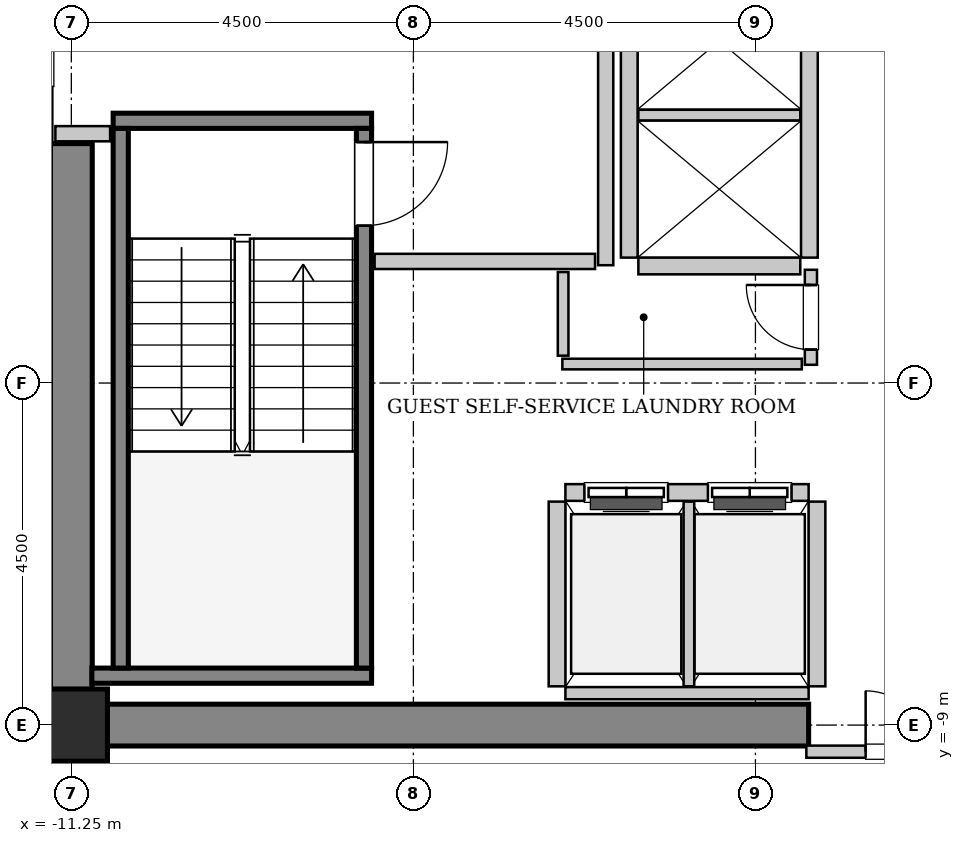
"""IFC4 building model, lengths in metres.
Left out: names, types, materials, properties, quantities, classifications, styles, units other than length and angle.
Written with IfcOpenShell. Run it as: python <this file> out.ifc"""

import sys

from ifc_helpers import new_model, si_unit, direction, frame, frame_2d, origin, origin_2d, place, context, subcontext, project, spatial, rectangle, hollow_rectangle, extrude, source, transform, mapped, element, fill, save


model = new_model("IFC4")
c1 = context("Model", 3, precision=1e-05, world=origin(), true_north=direction((0.0, 1.0)))
c2 = subcontext(c1, "Body", "Model", "MODEL_VIEW")
j1 = project(units=[si_unit("LENGTHUNIT", "METRE"), si_unit("PLANEANGLEUNIT", "RADIAN")], contexts=[c1])
p1 = place(None, origin())
s1 = spatial("IfcSite", under=j1, at=p1, CompositionType="ELEMENT")
p2 = place(p1, origin())
s2 = spatial("IfcBuilding", under=s1, at=p2, CompositionType="ELEMENT")
p3 = place(p2, frame((0.0, 0.0, 152.6)))
s3 = spatial("IfcBuildingStorey", under=s2, at=p3, CompositionType="ELEMENT", Elevation=152.6)
m1 = source(origin(), c2, "Body", "SweptSolid", [
    extrude(rectangle(XDim=9.975, YDim=0.55, at=frame_2d((4.987, 0.0))), origin(), (0.0, 0.0, 1.0), 3.8),
])
p4 = place(p3, frame((-11.525, -9.0, 0.0), z_axis=(0.0, 0.0, 1.0), x_axis=(1.0, 0.0, 0.0)))
e1 = element("IfcWall", 1, at=p4, inside=s3, PredefinedType="SHEAR", context=c2, shape_type="MappedRepresentation", body=[
    mapped(m1, transform((0.0, 0.0, 0.0), x_axis=(1.0, 0.0, 0.0), y_axis=(0.0, 1.0, 0.0), z_axis=(0.0, 0.0, 1.0), scale=1.0)),
])
m2 = source(origin(), c2, "Body", "SweptSolid", [
    extrude(rectangle(XDim=7.375, YDim=0.55, at=frame_2d((3.688, 0.0))), origin(), (0.0, 0.0, 1.0), 3.8),
])
p5 = place(p3, frame((-11.25, -8.725, 0.0), z_axis=(0.0, 0.0, 1.0), x_axis=(0.0, 1.0, 0.0)))
e2 = element("IfcWall", 2, at=p5, inside=s3, PredefinedType="SHEAR", context=c2, shape_type="MappedRepresentation", body=[
    mapped(m2, transform((0.0, 0.0, 0.0), x_axis=(1.0, 0.0, 0.0), y_axis=(0.0, 1.0, 0.0), z_axis=(0.0, 0.0, 1.0), scale=1.0)),
])
m3 = source(origin(), c2, "Body", "SweptSolid", [
    extrude(hollow_rectangle(XDim=0.95, YDim=0.95, WallThickness=0.045, InnerFilletRadius=0.045, OuterFilletRadius=0.09, at=origin_2d()), origin(), (0.0, 0.0, 1.0), 3.8),
])
p6 = place(p3, frame((-11.25, -9.0, 0.0), z_axis=(0.0, 0.0, 1.0), x_axis=(1.0, 0.0, 0.0)))
e3 = element("IfcColumn", 3, at=p6, inside=s3, PredefinedType="COLUMN", context=c2, shape_type="MappedRepresentation", body=[
    mapped(m3, transform((0.0, 0.0, 0.0), x_axis=(1.0, 0.0, 0.0), y_axis=(0.0, 1.0, 0.0), z_axis=(0.0, 0.0, 1.0), scale=1.0)),
])
m4 = source(origin(), c2, "Body", "SweptSolid", [
    extrude(rectangle(XDim=3.4, YDim=0.2, at=frame_2d((1.7, 0.0))), origin(), (0.0, 0.0, 1.0), 3.8),
])
p7 = place(p3, frame((-10.7, -1.05, 0.0), z_axis=(0.0, 0.0, 1.0), x_axis=(1.0, 0.0, 0.0)))
e4 = element("IfcWall", 4, at=p7, inside=s3, PredefinedType="SOLIDWALL", context=c2, shape_type="MappedRepresentation", body=[
    mapped(m4, transform((0.0, 0.0, 0.0), x_axis=(1.0, 0.0, 0.0), y_axis=(0.0, 1.0, 0.0), z_axis=(0.0, 0.0, 1.0), scale=1.0)),
])
m5 = source(origin(), c2, "Body", "SweptSolid", [
    extrude(rectangle(XDim=3.68, YDim=0.2, at=frame_2d((1.84, 0.0))), origin(), (0.0, 0.0, 1.0), 3.8),
])
p8 = place(p3, frame((-10.98, -8.35, 0.0), z_axis=(0.0, 0.0, 1.0), x_axis=(1.0, 0.0, 0.0)))
e5 = element("IfcWall", 5, at=p8, inside=s3, PredefinedType="SOLIDWALL", context=c2, shape_type="MappedRepresentation", body=[
    mapped(m5, transform((0.0, 0.0, 0.0), x_axis=(1.0, 0.0, 0.0), y_axis=(0.0, 1.0, 0.0), z_axis=(0.0, 0.0, 1.0), scale=1.0)),
])
m6 = source(origin(), c2, "Body", "SweptSolid", [
    extrude(rectangle(XDim=7.1, YDim=0.2, at=frame_2d((3.55, 0.0))), origin(), (0.0, 0.0, 1.0), 3.8),
])
p9 = place(p3, frame((-10.6, -1.15, 0.0), z_axis=(0.0, 0.0, 1.0), x_axis=(0.0, -1.0, 0.0)))
e6 = element("IfcWall", 6, at=p9, inside=s3, PredefinedType="SOLIDWALL", context=c2, shape_type="MappedRepresentation", body=[
    mapped(m6, transform((0.0, 0.0, 0.0), x_axis=(1.0, 0.0, 0.0), y_axis=(0.0, 1.0, 0.0), z_axis=(0.0, 0.0, 1.0), scale=1.0)),
])
p10 = place(p3, frame((-7.4, -1.15, 0.0), z_axis=(0.0, 0.0, 1.0), x_axis=(0.0, -1.0, 0.0)))
e7 = element("IfcWall", 7, at=p10, inside=s3, PredefinedType="SOLIDWALL", context=c2, shape_type="MappedRepresentation", body=[
    mapped(m6, transform((0.0, 0.0, 0.0), x_axis=(1.0, 0.0, 0.0), y_axis=(0.0, 1.0, 0.0), z_axis=(0.0, 0.0, 1.0), scale=1.0)),
])
p11 = place(p10, frame((0.18, 0.0, 0.0)))
e8 = element("IfcOpeningElement", 8, at=p11, cuts=e7, PredefinedType="OPENING", context=c2, shape_type="SweptSolid", body=[
    extrude(rectangle(XDim=1.1, YDim=2.15, at=frame_2d((0.55, 1.075))), frame((0.0, 0.11, 0.0), z_axis=(0.0, -1.0, 0.0), x_axis=(1.0, 0.0, 0.0)), (0.0, 0.0, 1.0), 0.22),
])
m7 = source(origin(), c2, "Body", "SweptSolid", [
    extrude(rectangle(XDim=3.2, YDim=0.22, at=frame_2d((1.6, 0.0))), origin(), (0.0, 0.0, 1.0), 3.535),
])
p12 = place(p3, frame((-1.55, -5.94, 0.0), z_axis=(0.0, 0.0, 1.0), x_axis=(-1.0, 0.0, 0.0)))
e9 = element("IfcWall", 9, at=p12, inside=s3, PredefinedType="SOLIDWALL", context=c2, shape_type="MappedRepresentation", body=[
    mapped(m7, transform((0.0, 0.0, 0.0), x_axis=(1.0, 0.0, 0.0), y_axis=(0.0, 1.0, 0.0), z_axis=(0.0, 0.0, 1.0), scale=1.0)),
])
p13 = place(p12, frame((1.85, 0.0, 0.0)))
e10 = element("IfcOpeningElement", 10, at=p13, cuts=e9, PredefinedType="OPENING", context=c2, shape_type="SweptSolid", body=[
    extrude(rectangle(XDim=1.1, YDim=2.2, at=frame_2d((0.55, 1.1))), frame((0.0, 0.12, 0.0), z_axis=(0.0, -1.0, 0.0), x_axis=(1.0, 0.0, 0.0)), (0.0, 0.0, 1.0), 0.24),
])
p14 = place(p12, frame((0.225, 0.0, 0.0)))
e11 = element("IfcOpeningElement", 11, at=p14, cuts=e9, PredefinedType="OPENING", context=c2, shape_type="SweptSolid", body=[
    extrude(rectangle(XDim=1.1, YDim=2.2, at=frame_2d((0.55, 1.1))), frame((0.0, 0.12, 0.0), z_axis=(0.0, -1.0, 0.0), x_axis=(1.0, 0.0, 0.0)), (0.0, 0.0, 1.0), 0.24),
])
m8 = source(origin(), c2, "Body", "SweptSolid", [
    extrude(rectangle(XDim=3.2, YDim=0.16, at=frame_2d((1.6, 0.0))), origin(), (0.0, 0.0, 1.0), 2.425),
])
p15 = place(p3, frame((-4.75, -8.58, 0.0), z_axis=(0.0, 0.0, 1.0), x_axis=(1.0, 0.0, 0.0)))
e12 = element("IfcWall", 12, at=p15, inside=s3, PredefinedType="PARTITIONING", context=c2, shape_type="MappedRepresentation", body=[
    mapped(m8, transform((0.0, 0.0, 0.0), x_axis=(1.0, 0.0, 0.0), y_axis=(0.0, 1.0, 0.0), z_axis=(0.0, 0.0, 1.0), scale=1.0)),
])
m9 = source(origin(), c2, "Body", "SweptSolid", [
    extrude(rectangle(XDim=2.43, YDim=0.22, at=frame_2d((1.215, 0.0))), origin(), (0.0, 0.0, 1.0), 3.535),
])
p16 = place(p3, frame((-4.86, -6.06, 0.0), z_axis=(0.0, 0.0, 1.0), x_axis=(0.0, -1.0, 0.0)))
e13 = element("IfcWall", 13, at=p16, inside=s3, PredefinedType="SOLIDWALL", context=c2, shape_type="MappedRepresentation", body=[
    mapped(m9, transform((0.0, 0.0, 0.0), x_axis=(1.0, 0.0, 0.0), y_axis=(0.0, 1.0, 0.0), z_axis=(0.0, 0.0, 1.0), scale=1.0)),
])
m10 = source(origin(), c2, "Body", "SweptSolid", [
    extrude(rectangle(XDim=2.43, YDim=0.14, at=frame_2d((1.215, 0.0))), origin(), (0.0, 0.0, 1.0), 3.535),
])
p17 = place(p3, frame((-3.125, -8.49, 0.0), z_axis=(0.0, 0.0, 1.0), x_axis=(0.0, 1.0, 0.0)))
e14 = element("IfcWall", 14, at=p17, inside=s3, PredefinedType="PARTITIONING", context=c2, shape_type="MappedRepresentation", body=[
    mapped(m10, transform((0.0, 0.0, 0.0), x_axis=(1.0, 0.0, 0.0), y_axis=(0.0, 1.0, 0.0), z_axis=(0.0, 0.0, 1.0), scale=1.0)),
])
p18 = place(p3, frame((-1.44, -8.49, 0.0), z_axis=(0.0, 0.0, 1.0), x_axis=(0.0, 1.0, 0.0)))
e15 = element("IfcWall", 15, at=p18, inside=s3, PredefinedType="SOLIDWALL", context=c2, shape_type="MappedRepresentation", body=[
    mapped(m9, transform((0.0, 0.0, 0.0), x_axis=(1.0, 0.0, 0.0), y_axis=(0.0, 1.0, 0.0), z_axis=(0.0, 0.0, 1.0), scale=1.0)),
])
m11 = source(origin(), c2, "Body", "SweptSolid", [
    extrude(rectangle(XDim=5.7, YDim=0.22, at=frame_2d((2.85, 0.0))), origin(), (0.0, 0.0, 1.0), 3.535),
])
for number, where, z_axis, x_axis in (
    (16, (-1.54, -2.85, 0.0), (0.0, 0.0, 1.0), (0.0, 1.0, 0.0)),
    (17, (-3.91, 2.85, 0.0), (0.0, 0.0, 1.0), (0.0, -1.0, 0.0)),
):
    element("IfcWall", number, at=place(p3, frame(where, z_axis=z_axis, x_axis=x_axis)), inside=s3, PredefinedType="SOLIDWALL", context=c2, shape_type="MappedRepresentation", body=[
        mapped(m11, transform((0.0, 0.0, 0.0), x_axis=(1.0, 0.0, 0.0), y_axis=(0.0, 1.0, 0.0), z_axis=(0.0, 0.0, 1.0), scale=1.0)),
    ])
m12 = source(origin(), c2, "Body", "SweptSolid", [
    extrude(rectangle(XDim=2.13, YDim=0.22, at=frame_2d((1.065, 0.0))), origin(), (0.0, 0.0, 1.0), 3.535),
])
p19 = place(p3, frame((-3.79, -2.96, 0.0), z_axis=(0.0, 0.0, 1.0), x_axis=(1.0, 0.0, 0.0)))
e18 = element("IfcWall", 18, at=p19, inside=s3, PredefinedType="SOLIDWALL", context=c2, shape_type="MappedRepresentation", body=[
    mapped(m12, transform((0.0, 0.0, 0.0), x_axis=(1.0, 0.0, 0.0), y_axis=(0.0, 1.0, 0.0), z_axis=(0.0, 0.0, 1.0), scale=1.0)),
])
m13 = source(origin(), c2, "Body", "SweptSolid", [
    extrude(rectangle(XDim=2.13, YDim=0.14, at=frame_2d((1.065, 0.0))), origin(), (0.0, 0.0, 1.0), 3.535),
])
p20 = place(p3, frame((-3.79, -0.975, 0.0), z_axis=(0.0, 0.0, 1.0), x_axis=(1.0, 0.0, 0.0)))
e19 = element("IfcWall", 19, at=p20, inside=s3, PredefinedType="PARTITIONING", context=c2, shape_type="MappedRepresentation", body=[
    mapped(m13, transform((0.0, 0.0, 0.0), x_axis=(1.0, 0.0, 0.0), y_axis=(0.0, 1.0, 0.0), z_axis=(0.0, 0.0, 1.0), scale=1.0)),
])
m14 = source(origin(), c2, "Body", "SweptSolid", [
    extrude(rectangle(XDim=5.9, YDim=0.2, at=frame_2d((2.95, 0.0))), origin(), (0.0, 0.0, 1.0), 3.535),
])
p21 = place(p3, frame((-4.22, -2.95, 0.0), z_axis=(0.0, 0.0, 1.0), x_axis=(0.0, 1.0, 0.0)))
e20 = element("IfcWall", 20, at=p21, inside=s3, PredefinedType="PARTITIONING", context=c2, shape_type="MappedRepresentation", body=[
    mapped(m14, transform((0.0, 0.0, 0.0), x_axis=(1.0, 0.0, 0.0), y_axis=(0.0, 1.0, 0.0), z_axis=(0.0, 0.0, 1.0), scale=1.0)),
])
m15 = source(origin(), c2, "Body", "SweptSolid", [
    extrude(rectangle(XDim=2.9, YDim=0.2, at=frame_2d((1.45, 0.0))), origin(), (0.0, 0.0, 1.0), 3.535),
])
p22 = place(p3, frame((-7.26, -2.9, 0.0), z_axis=(0.0, 0.0, 1.0), x_axis=(1.0, 0.0, 0.0)))
e21 = element("IfcWall", 21, at=p22, inside=s3, PredefinedType="PARTITIONING", context=c2, shape_type="MappedRepresentation", body=[
    mapped(m15, transform((0.0, 0.0, 0.0), x_axis=(1.0, 0.0, 0.0), y_axis=(0.0, 1.0, 0.0), z_axis=(0.0, 0.0, 1.0), scale=1.0)),
])
m16 = source(origin(), c2, "Body", "SweptSolid", [
    extrude(rectangle(XDim=0.72, YDim=0.2, at=frame_2d((0.36, 0.0))), origin(), (0.0, 0.0, 1.0), 3.535),
])
p23 = place(p3, frame((-11.46, -1.22, 0.0), z_axis=(0.0, 0.0, 1.0), x_axis=(1.0, 0.0, 0.0)))
e22 = element("IfcWall", 22, at=p23, inside=s3, PredefinedType="PARTITIONING", context=c2, shape_type="MappedRepresentation", body=[
    mapped(m16, transform((0.0, 0.0, 0.0), x_axis=(1.0, 0.0, 0.0), y_axis=(0.0, 1.0, 0.0), z_axis=(0.0, 0.0, 1.0), scale=1.0)),
])
m17 = source(origin(), c2, "Body", "SweptSolid", [
    extrude(rectangle(XDim=3.16, YDim=0.16, at=frame_2d((1.58, 0.0))), origin(), (0.0, 0.0, 1.0), 2.425),
])
p24 = place(p3, frame((-1.58, -9.35, 0.0), z_axis=(0.0, 0.0, 1.0), x_axis=(1.0, 0.0, 0.0)))
e23 = element("IfcWall", 23, at=p24, inside=s3, PredefinedType="PARTITIONING", context=c2, shape_type="MappedRepresentation", body=[
    mapped(m17, transform((0.0, 0.0, 0.0), x_axis=(1.0, 0.0, 0.0), y_axis=(0.0, 1.0, 0.0), z_axis=(0.0, 0.0, 1.0), scale=1.0)),
])
p25 = place(p24, frame((0.78, 0.0, 0.0)))
e24 = element("IfcOpeningElement", 24, at=p25, cuts=e23, PredefinedType="OPENING", context=c2, shape_type="SweptSolid", body=[
    extrude(rectangle(XDim=1.6, YDim=2.3, at=frame_2d((0.8, 1.15))), frame((0.0, 0.09, 0.0), z_axis=(0.0, -1.0, 0.0), x_axis=(1.0, 0.0, 0.0)), (0.0, 0.0, 1.0), 0.18),
])
m18 = source(origin(), c2, "Body", "SweptSolid", [
    extrude(rectangle(XDim=1.25, YDim=0.16, at=frame_2d((0.625, 0.0))), origin(), (0.0, 0.0, 1.0), 3.535),
])
p26 = place(p3, frame((-1.52, -4.26, 0.0), z_axis=(0.0, 0.0, 1.0), x_axis=(0.0, 1.0, 0.0)))
e25 = element("IfcWall", 25, at=p26, inside=s3, PredefinedType="PARTITIONING", context=c2, shape_type="MappedRepresentation", body=[
    mapped(m18, transform((0.0, 0.0, 0.0), x_axis=(1.0, 0.0, 0.0), y_axis=(0.0, 1.0, 0.0), z_axis=(0.0, 0.0, 1.0), scale=1.0)),
])
p27 = place(p26, frame((0.2, 0.0, 0.0)))
e26 = element("IfcOpeningElement", 26, at=p27, cuts=e25, PredefinedType="OPENING", context=c2, shape_type="SweptSolid", body=[
    extrude(rectangle(XDim=0.85, YDim=2.1, at=frame_2d((0.425, 1.05))), frame((0.0, 0.09, 0.0), z_axis=(0.0, -1.0, 0.0), x_axis=(1.0, 0.0, 0.0)), (0.0, 0.0, 1.0), 0.18),
])
m19 = source(origin(), c2, "Body", "SweptSolid", [
    extrude(rectangle(XDim=3.15, YDim=0.14, at=frame_2d((1.575, 0.0))), origin(), (0.0, 0.0, 1.0), 3.535),
])
p28 = place(p3, frame((-4.79, -4.25, 0.0), z_axis=(0.0, 0.0, 1.0), x_axis=(1.0, 0.0, 0.0)))
e27 = element("IfcWall", 27, at=p28, inside=s3, PredefinedType="PARTITIONING", context=c2, shape_type="MappedRepresentation", body=[
    mapped(m19, transform((0.0, 0.0, 0.0), x_axis=(1.0, 0.0, 0.0), y_axis=(0.0, 1.0, 0.0), z_axis=(0.0, 0.0, 1.0), scale=1.0)),
])
m20 = source(origin(), c2, "Body", "SweptSolid", [
    extrude(rectangle(XDim=1.1, YDim=0.14, at=frame_2d((0.55, 0.0))), origin(), (0.0, 0.0, 1.0), 3.535),
])
p29 = place(p3, frame((-4.78, -4.14, 0.0), z_axis=(0.0, 0.0, 1.0), x_axis=(0.0, 1.0, 0.0)))
e28 = element("IfcWall", 28, at=p29, inside=s3, PredefinedType="PARTITIONING", context=c2, shape_type="MappedRepresentation", body=[
    mapped(m20, transform((0.0, 0.0, 0.0), x_axis=(1.0, 0.0, 0.0), y_axis=(0.0, 1.0, 0.0), z_axis=(0.0, 0.0, 1.0), scale=1.0)),
])
m21 = source(origin(), c2, "Body", "SweptSolid", [
    extrude(rectangle(XDim=1.1, YDim=2.15, at=frame_2d((0.55, 1.075))), frame((0.0, 0.025, 0.0), z_axis=(0.0, -1.0, 0.0), x_axis=(1.0, 0.0, 0.0)), (0.0, 0.0, 1.0), 0.05),
])
p30 = place(p11, origin())
e29 = element("IfcDoor", 29, at=p30, inside=s3, OperationType="SINGLE_SWING_LEFT", PredefinedType="DOOR", context=c2, shape_type="MappedRepresentation", body=[
    mapped(m21, transform((0.0, 0.0, 0.0), x_axis=(1.0, 0.0, 0.0), y_axis=(0.0, 1.0, 0.0), z_axis=(0.0, 0.0, 1.0), scale=1.0)),
])
fill(e8, e29)
m22 = source(origin(), c2, "Body", "SweptSolid", [
    extrude(rectangle(XDim=1.1, YDim=2.2, at=frame_2d((0.55, 1.1))), frame((0.0, 0.025, 0.0), z_axis=(0.0, -1.0, 0.0), x_axis=(1.0, 0.0, 0.0)), (0.0, 0.0, 1.0), 0.05),
])
p31 = place(p13, origin())
e30 = element("IfcDoor", 30, at=p31, inside=s3, OperationType="DOUBLE_DOOR_SLIDING", PredefinedType="DOOR", context=c2, shape_type="MappedRepresentation", body=[
    mapped(m22, transform((0.0, 0.0, 0.0), x_axis=(1.0, 0.0, 0.0), y_axis=(0.0, 1.0, 0.0), z_axis=(0.0, 0.0, 1.0), scale=1.0)),
])
fill(e10, e30)
p32 = place(p14, origin())
e31 = element("IfcDoor", 31, at=p32, inside=s3, OperationType="DOUBLE_DOOR_SLIDING", PredefinedType="DOOR", context=c2, shape_type="MappedRepresentation", body=[
    mapped(m22, transform((0.0, 0.0, 0.0), x_axis=(1.0, 0.0, 0.0), y_axis=(0.0, 1.0, 0.0), z_axis=(0.0, 0.0, 1.0), scale=1.0)),
])
fill(e11, e31)
m23 = source(origin(), c2, "Body", "SweptSolid", [
    extrude(rectangle(XDim=1.6, YDim=2.3, at=frame_2d((0.8, 1.15))), frame((0.0, 0.025, 0.0), z_axis=(0.0, -1.0, 0.0), x_axis=(1.0, 0.0, 0.0)), (0.0, 0.0, 1.0), 0.05),
])
p33 = place(p25, origin())
e32 = element("IfcDoor", 32, at=p33, inside=s3, OperationType="DOUBLE_DOOR_SINGLE_SWING", PredefinedType="DOOR", context=c2, shape_type="MappedRepresentation", body=[
    mapped(m23, transform((0.0, 0.0, 0.0), x_axis=(1.0, 0.0, 0.0), y_axis=(0.0, 1.0, 0.0), z_axis=(0.0, 0.0, 1.0), scale=1.0)),
])
fill(e24, e32)
m24 = source(origin(), c2, "Body", "SweptSolid", [
    extrude(rectangle(XDim=0.85, YDim=2.1, at=frame_2d((0.425, 1.05))), frame((0.0, 0.025, 0.0), z_axis=(0.0, -1.0, 0.0), x_axis=(1.0, 0.0, 0.0)), (0.0, 0.0, 1.0), 0.05),
])
p34 = place(p27, origin())
e33 = element("IfcDoor", 33, at=p34, inside=s3, OperationType="SINGLE_SWING_RIGHT", PredefinedType="DOOR", context=c2, shape_type="MappedRepresentation", body=[
    mapped(m24, transform((0.0, 0.0, 0.0), x_axis=(1.0, 0.0, 0.0), y_axis=(0.0, 1.0, 0.0), z_axis=(0.0, 0.0, 1.0), scale=1.0)),
])
fill(e26, e33)
save(model, sys.argv[1])
